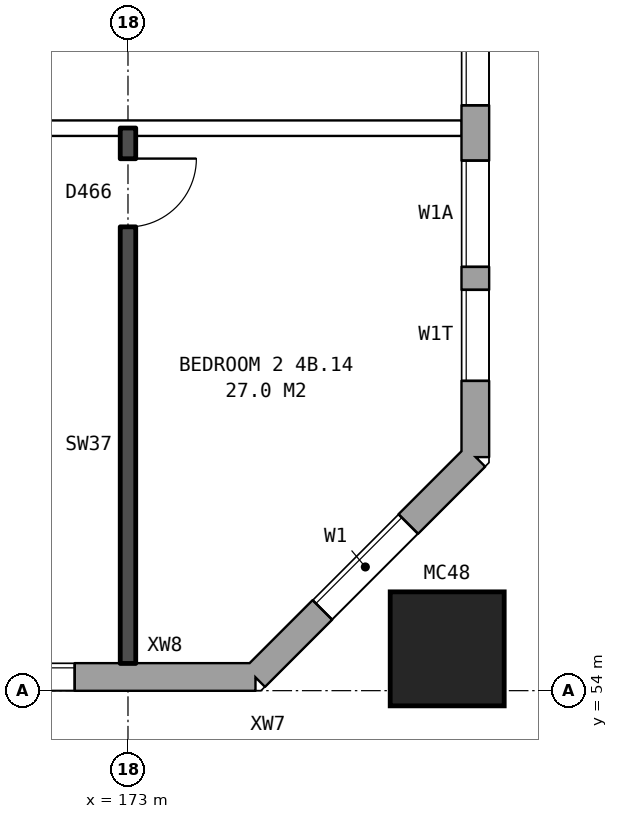
"""IFC4 building model, lengths in metres.
Left out: names, types, materials, properties, quantities, classifications, styles, units other than length and angle.
Written with IfcOpenShell. Run it as: python <this file> out.ifc"""

import sys

from ifc_helpers import new_model, si_unit, direction, frame, frame_2d, origin, origin_2d, place, context, subcontext, project, spatial, rectangle, hollow_rectangle, extrude, element, fill, save


model = new_model("IFC4")
c1 = context("Model", 3, precision=1e-05, world=origin(), true_north=direction((0.0, 1.0)))
c2 = subcontext(c1, "Body", "Model", "MODEL_VIEW")
j1 = project(units=[si_unit("LENGTHUNIT", "METRE"), si_unit("PLANEANGLEUNIT", "RADIAN")], contexts=[c1])
p1 = place(None, origin())
s1 = spatial("IfcSite", under=j1, at=p1, CompositionType="ELEMENT")
p2 = place(p1, origin())
s2 = spatial("IfcBuilding", under=s1, at=p2, CompositionType="ELEMENT")
p3 = place(p2, frame((0.0, 0.0, 19.5)))
s3 = spatial("IfcBuildingStorey", under=s2, at=p3, CompositionType="ELEMENT", Elevation=19.5)
p4 = place(p3, frame((177.2, 54.55, 0.0), z_axis=(0.0, 0.0, 1.0), x_axis=(1.0, 0.0, 0.0)))
e1 = element("IfcColumn", 1, at=p4, inside=s3, PredefinedType="COLUMN", context=c2, shape_type="SweptSolid", body=[
    extrude(hollow_rectangle(XDim=1.5, YDim=1.5, WallThickness=0.08, at=origin_2d()), origin(), (0.0, 0.0, 1.0), 3.1),
])
p5 = place(p3, frame((134.075, 54.18, 0.0), z_axis=(0.0, 0.0, 1.0), x_axis=(1.0, 0.0, 0.0)))
e2 = element("IfcWall", 2, at=p5, inside=s3, PredefinedType="STANDARD", context=c2, shape_type="SweptSolid", body=[
    extrude(rectangle(XDim=40.601, YDim=0.36, at=frame_2d((20.3, 0.0))), origin(), (0.0, 0.0, 1.0), 2.85),
])
p6 = place(p5, frame((0.3, 0.0, 0.8)))
e3 = element("IfcOpeningElement", 3, at=p6, cuts=e2, PredefinedType="OPENING", context=c2, shape_type="SweptSolid", body=[
    extrude(rectangle(XDim=0.8, YDim=0.9, at=frame_2d((0.4, 0.45))), frame((0.0, 0.19, 0.0), z_axis=(0.0, -1.0, 0.0), x_axis=(1.0, 0.0, 0.0)), (0.0, 0.0, 1.0), 0.38),
])
p7 = place(p5, frame((3.625, 0.0, 0.8)))
e4 = element("IfcOpeningElement", 4, at=p7, cuts=e2, PredefinedType="OPENING", context=c2, shape_type="SweptSolid", body=[
    extrude(rectangle(XDim=1.6, YDim=1.8, at=frame_2d((0.8, 0.9))), frame((0.0, 0.19, 0.0), z_axis=(0.0, -1.0, 0.0), x_axis=(1.0, 0.0, 0.0)), (0.0, 0.0, 1.0), 0.38),
])
p8 = place(p5, frame((6.625, 0.0, 0.8)))
e5 = element("IfcOpeningElement", 5, at=p8, cuts=e2, PredefinedType="OPENING", context=c2, shape_type="SweptSolid", body=[
    extrude(rectangle(XDim=1.6, YDim=1.8, at=frame_2d((0.8, 0.9))), frame((0.0, 0.19, 0.0), z_axis=(0.0, -1.0, 0.0), x_axis=(1.0, 0.0, 0.0)), (0.0, 0.0, 1.0), 0.38),
])
p9 = place(p5, frame((9.625, 0.0, 0.8)))
e6 = element("IfcOpeningElement", 6, at=p9, cuts=e2, PredefinedType="OPENING", context=c2, shape_type="SweptSolid", body=[
    extrude(rectangle(XDim=1.6, YDim=1.8, at=frame_2d((0.8, 0.9))), frame((0.0, 0.19, 0.0), z_axis=(0.0, -1.0, 0.0), x_axis=(1.0, 0.0, 0.0)), (0.0, 0.0, 1.0), 0.38),
])
p10 = place(p5, frame((12.625, 0.0, 0.8)))
e7 = element("IfcOpeningElement", 7, at=p10, cuts=e2, PredefinedType="OPENING", context=c2, shape_type="SweptSolid", body=[
    extrude(rectangle(XDim=1.6, YDim=1.8, at=frame_2d((0.8, 0.9))), frame((0.0, 0.19, 0.0), z_axis=(0.0, -1.0, 0.0), x_axis=(1.0, 0.0, 0.0)), (0.0, 0.0, 1.0), 0.38),
])
p11 = place(p5, frame((15.625, 0.0, 0.8)))
e8 = element("IfcOpeningElement", 8, at=p11, cuts=e2, PredefinedType="OPENING", context=c2, shape_type="SweptSolid", body=[
    extrude(rectangle(XDim=1.6, YDim=1.8, at=frame_2d((0.8, 0.9))), frame((0.0, 0.19, 0.0), z_axis=(0.0, -1.0, 0.0), x_axis=(1.0, 0.0, 0.0)), (0.0, 0.0, 1.0), 0.38),
])
p12 = place(p5, frame((18.625, 0.0, 0.8)))
e9 = element("IfcOpeningElement", 9, at=p12, cuts=e2, PredefinedType="OPENING", context=c2, shape_type="SweptSolid", body=[
    extrude(rectangle(XDim=1.6, YDim=1.8, at=frame_2d((0.8, 0.9))), frame((0.0, 0.19, 0.0), z_axis=(0.0, -1.0, 0.0), x_axis=(1.0, 0.0, 0.0)), (0.0, 0.0, 1.0), 0.38),
])
p13 = place(p5, frame((21.625, 0.0, 0.8)))
e10 = element("IfcOpeningElement", 10, at=p13, cuts=e2, PredefinedType="OPENING", context=c2, shape_type="SweptSolid", body=[
    extrude(rectangle(XDim=1.6, YDim=1.8, at=frame_2d((0.8, 0.9))), frame((0.0, 0.19, 0.0), z_axis=(0.0, -1.0, 0.0), x_axis=(1.0, 0.0, 0.0)), (0.0, 0.0, 1.0), 0.38),
])
p14 = place(p5, frame((24.625, 0.0, 0.8)))
e11 = element("IfcOpeningElement", 11, at=p14, cuts=e2, PredefinedType="OPENING", context=c2, shape_type="SweptSolid", body=[
    extrude(rectangle(XDim=1.6, YDim=1.8, at=frame_2d((0.8, 0.9))), frame((0.0, 0.19, 0.0), z_axis=(0.0, -1.0, 0.0), x_axis=(1.0, 0.0, 0.0)), (0.0, 0.0, 1.0), 0.38),
])
p15 = place(p5, frame((27.625, 0.0, 0.8)))
e12 = element("IfcOpeningElement", 12, at=p15, cuts=e2, PredefinedType="OPENING", context=c2, shape_type="SweptSolid", body=[
    extrude(rectangle(XDim=1.6, YDim=1.8, at=frame_2d((0.8, 0.9))), frame((0.0, 0.19, 0.0), z_axis=(0.0, -1.0, 0.0), x_axis=(1.0, 0.0, 0.0)), (0.0, 0.0, 1.0), 0.38),
])
p16 = place(p5, frame((30.625, 0.0, 0.8)))
e13 = element("IfcOpeningElement", 13, at=p16, cuts=e2, PredefinedType="OPENING", context=c2, shape_type="SweptSolid", body=[
    extrude(rectangle(XDim=1.6, YDim=1.8, at=frame_2d((0.8, 0.9))), frame((0.0, 0.19, 0.0), z_axis=(0.0, -1.0, 0.0), x_axis=(1.0, 0.0, 0.0)), (0.0, 0.0, 1.0), 0.38),
])
p17 = place(p5, frame((33.625, 0.0, 0.8)))
e14 = element("IfcOpeningElement", 14, at=p17, cuts=e2, PredefinedType="OPENING", context=c2, shape_type="SweptSolid", body=[
    extrude(rectangle(XDim=1.6, YDim=1.8, at=frame_2d((0.8, 0.9))), frame((0.0, 0.19, 0.0), z_axis=(0.0, -1.0, 0.0), x_axis=(1.0, 0.0, 0.0)), (0.0, 0.0, 1.0), 0.38),
])
p18 = place(p5, frame((36.625, 0.0, 0.8)))
e15 = element("IfcOpeningElement", 15, at=p18, cuts=e2, PredefinedType="OPENING", context=c2, shape_type="SweptSolid", body=[
    extrude(rectangle(XDim=1.6, YDim=1.8, at=frame_2d((0.8, 0.9))), frame((0.0, 0.19, 0.0), z_axis=(0.0, -1.0, 0.0), x_axis=(1.0, 0.0, 0.0)), (0.0, 0.0, 1.0), 0.38),
])
p19 = place(p5, frame((1.4, 0.0, 0.8)))
e16 = element("IfcOpeningElement", 16, at=p19, cuts=e2, PredefinedType="OPENING", context=c2, shape_type="SweptSolid", body=[
    extrude(rectangle(XDim=1.2, YDim=1.8, at=frame_2d((0.6, 0.9))), frame((0.0, 0.19, 0.0), z_axis=(0.0, -1.0, 0.0), x_axis=(1.0, 0.0, 0.0)), (0.0, 0.0, 1.0), 0.38),
])
p20 = place(p3, frame((174.675, 54.18, 0.0), z_axis=(0.0, 0.0, 1.0), x_axis=(0.707106781187, 0.707106781187, 0.0)))
e17 = element("IfcWall", 17, at=p20, inside=s3, PredefinedType="STANDARD", context=c2, shape_type="SweptSolid", body=[
    extrude(rectangle(XDim=4.094, YDim=0.36, at=frame_2d((2.047, 0.0))), origin(), (0.0, 0.0, 1.0), 2.85),
])
p21 = place(p20, frame((1.247, 0.0, 0.8)))
e18 = element("IfcOpeningElement", 18, at=p21, cuts=e17, PredefinedType="OPENING", context=c2, shape_type="SweptSolid", body=[
    extrude(rectangle(XDim=1.6, YDim=1.8, at=frame_2d((0.8, 0.9))), frame((0.0, 0.19, 0.0), z_axis=(0.0, -1.0, 0.0), x_axis=(1.0, 0.0, 0.0)), (0.0, 0.0, 1.0), 0.38),
])
p22 = place(p3, frame((177.57, 57.075, 0.0), z_axis=(0.0, 0.0, 1.0), x_axis=(0.0, 1.0, 0.0)))
e19 = element("IfcWall", 19, at=p22, inside=s3, PredefinedType="STANDARD", context=c2, shape_type="SweptSolid", body=[
    extrude(rectangle(XDim=25.851, YDim=0.36, at=frame_2d((12.925, 0.0))), origin(), (0.0, 0.0, 1.0), 2.85),
])
p23 = place(p22, frame((1.0, 0.0, 0.8)))
e20 = element("IfcOpeningElement", 20, at=p23, cuts=e19, PredefinedType="OPENING", context=c2, shape_type="SweptSolid", body=[
    extrude(rectangle(XDim=1.2, YDim=0.9, at=frame_2d((0.6, 0.45))), frame((0.0, 0.19, 0.0), z_axis=(0.0, -1.0, 0.0), x_axis=(1.0, 0.0, 0.0)), (0.0, 0.0, 1.0), 0.38),
])
p24 = place(p22, frame((4.625, 0.0, 0.8)))
e21 = element("IfcOpeningElement", 21, at=p24, cuts=e19, PredefinedType="OPENING", context=c2, shape_type="SweptSolid", body=[
    extrude(rectangle(XDim=1.6, YDim=1.8, at=frame_2d((0.8, 0.9))), frame((0.0, 0.19, 0.0), z_axis=(0.0, -1.0, 0.0), x_axis=(1.0, 0.0, 0.0)), (0.0, 0.0, 1.0), 0.38),
])
p25 = place(p22, frame((7.625, 0.0, 0.8)))
e22 = element("IfcOpeningElement", 22, at=p25, cuts=e19, PredefinedType="OPENING", context=c2, shape_type="SweptSolid", body=[
    extrude(rectangle(XDim=1.6, YDim=1.8, at=frame_2d((0.8, 0.9))), frame((0.0, 0.19, 0.0), z_axis=(0.0, -1.0, 0.0), x_axis=(1.0, 0.0, 0.0)), (0.0, 0.0, 1.0), 0.38),
])
p26 = place(p22, frame((10.625, 0.0, 0.8)))
e23 = element("IfcOpeningElement", 23, at=p26, cuts=e19, PredefinedType="OPENING", context=c2, shape_type="SweptSolid", body=[
    extrude(rectangle(XDim=1.6, YDim=1.8, at=frame_2d((0.8, 0.9))), frame((0.0, 0.19, 0.0), z_axis=(0.0, -1.0, 0.0), x_axis=(1.0, 0.0, 0.0)), (0.0, 0.0, 1.0), 0.38),
])
p27 = place(p22, frame((13.625, 0.0, 0.8)))
e24 = element("IfcOpeningElement", 24, at=p27, cuts=e19, PredefinedType="OPENING", context=c2, shape_type="SweptSolid", body=[
    extrude(rectangle(XDim=1.6, YDim=1.8, at=frame_2d((0.8, 0.9))), frame((0.0, 0.19, 0.0), z_axis=(0.0, -1.0, 0.0), x_axis=(1.0, 0.0, 0.0)), (0.0, 0.0, 1.0), 0.38),
])
p28 = place(p22, frame((16.625, 0.0, 0.8)))
e25 = element("IfcOpeningElement", 25, at=p28, cuts=e19, PredefinedType="OPENING", context=c2, shape_type="SweptSolid", body=[
    extrude(rectangle(XDim=1.6, YDim=1.8, at=frame_2d((0.8, 0.9))), frame((0.0, 0.19, 0.0), z_axis=(0.0, -1.0, 0.0), x_axis=(1.0, 0.0, 0.0)), (0.0, 0.0, 1.0), 0.38),
])
p29 = place(p22, frame((19.625, 0.0, 0.8)))
e26 = element("IfcOpeningElement", 26, at=p29, cuts=e19, PredefinedType="OPENING", context=c2, shape_type="SweptSolid", body=[
    extrude(rectangle(XDim=1.6, YDim=1.8, at=frame_2d((0.8, 0.9))), frame((0.0, 0.19, 0.0), z_axis=(0.0, -1.0, 0.0), x_axis=(1.0, 0.0, 0.0)), (0.0, 0.0, 1.0), 0.38),
])
p30 = place(p22, frame((21.725, 0.0, 0.8)))
e27 = element("IfcOpeningElement", 27, at=p30, cuts=e19, PredefinedType="OPENING", context=c2, shape_type="SweptSolid", body=[
    extrude(rectangle(XDim=1.6, YDim=1.8, at=frame_2d((0.8, 0.9))), frame((0.0, 0.19, 0.0), z_axis=(0.0, -1.0, 0.0), x_axis=(1.0, 0.0, 0.0)), (0.0, 0.0, 1.0), 0.38),
])
p31 = place(p22, frame((2.5, 0.0, 0.8)))
e28 = element("IfcOpeningElement", 28, at=p31, cuts=e19, PredefinedType="OPENING", context=c2, shape_type="SweptSolid", body=[
    extrude(rectangle(XDim=1.4, YDim=1.8, at=frame_2d((0.7, 0.9))), frame((0.0, 0.19, 0.0), z_axis=(0.0, -1.0, 0.0), x_axis=(1.0, 0.0, 0.0)), (0.0, 0.0, 1.0), 0.38),
])
p32 = place(p22, frame((23.625, 0.0, 0.8)))
e29 = element("IfcOpeningElement", 29, at=p32, cuts=e19, PredefinedType="OPENING", context=c2, shape_type="SweptSolid", body=[
    extrude(rectangle(XDim=0.6, YDim=1.2, at=frame_2d((0.3, 0.6))), frame((0.0, 0.19, 0.0), z_axis=(0.0, -1.0, 0.0), x_axis=(1.0, 0.0, 0.0)), (0.0, 0.0, 1.0), 0.38),
])
p33 = place(p3, frame((155.1, 61.4, 0.0), z_axis=(0.0, 0.0, 1.0), x_axis=(1.0, 0.0, 0.0)))
e30 = element("IfcWall", 30, at=p33, inside=s3, PredefinedType="PARTITIONING", context=c2, shape_type="SweptSolid", body=[
    extrude(rectangle(XDim=22.29, YDim=0.2, at=frame_2d((11.145, 0.0))), origin(), (0.0, 0.0, 1.0), 2.85),
])
p34 = place(p33, frame((2.45, 0.0, 0.0)))
e31 = element("IfcOpeningElement", 31, at=p34, cuts=e30, PredefinedType="OPENING", context=c2, shape_type="SweptSolid", body=[
    extrude(rectangle(XDim=1.0, YDim=2.1, at=frame_2d((0.5, 1.05))), frame((0.0, 0.11, 0.0), z_axis=(0.0, -1.0, 0.0), x_axis=(1.0, 0.0, 0.0)), (0.0, 0.0, 1.0), 0.22),
])
p35 = place(p33, frame((14.4, 0.0, 0.0)))
e32 = element("IfcOpeningElement", 32, at=p35, cuts=e30, PredefinedType="OPENING", context=c2, shape_type="SweptSolid", body=[
    extrude(rectangle(XDim=1.0, YDim=2.1, at=frame_2d((0.5, 1.05))), frame((0.0, 0.11, 0.0), z_axis=(0.0, -1.0, 0.0), x_axis=(1.0, 0.0, 0.0)), (0.0, 0.0, 1.0), 0.22),
])
p36 = place(p3, frame((173.0, 54.36, 0.0), z_axis=(0.0, 0.0, 1.0), x_axis=(0.0, 1.0, 0.0)))
e33 = element("IfcWall", 33, at=p36, inside=s3, PredefinedType="SOLIDWALL", context=c2, shape_type="SweptSolid", body=[
    extrude(rectangle(XDim=7.04, YDim=0.2, at=frame_2d((3.52, 0.0))), origin(), (0.0, 0.0, 1.0), 2.85),
])
p37 = place(p36, frame((5.74, 0.0, 0.0)))
e34 = element("IfcOpeningElement", 34, at=p37, cuts=e33, PredefinedType="OPENING", context=c2, shape_type="SweptSolid", body=[
    extrude(rectangle(XDim=0.9, YDim=2.1, at=frame_2d((0.45, 1.05))), frame((0.0, 0.11, 0.0), z_axis=(0.0, -1.0, 0.0), x_axis=(1.0, 0.0, 0.0)), (0.0, 0.0, 1.0), 0.22),
])
p38 = place(p18, origin())
e35 = element("IfcWindow", 35, at=p38, inside=s3, PartitioningType="SINGLE_PANEL", PredefinedType="WINDOW", context=c2, shape_type="SweptSolid", body=[
    extrude(rectangle(XDim=1.6, YDim=1.8, at=frame_2d((0.8, 0.9))), frame((0.0, 0.15, 0.0), z_axis=(0.0, -1.0, 0.0), x_axis=(1.0, 0.0, 0.0)), (0.0, 0.0, 1.0), 0.06),
])
fill(e15, e35)
p39 = place(p21, origin())
e36 = element("IfcWindow", 36, at=p39, inside=s3, PartitioningType="SINGLE_PANEL", PredefinedType="WINDOW", context=c2, shape_type="SweptSolid", body=[
    extrude(rectangle(XDim=1.6, YDim=1.8, at=frame_2d((0.8, 0.9))), frame((0.0, 0.15, 0.0), z_axis=(0.0, -1.0, 0.0), x_axis=(1.0, 0.0, 0.0)), (0.0, 0.0, 1.0), 0.06),
])
fill(e18, e36)
p40 = place(p23, origin())
e37 = element("IfcWindow", 37, at=p40, inside=s3, PartitioningType="SINGLE_PANEL", PredefinedType="WINDOW", context=c2, shape_type="SweptSolid", body=[
    extrude(rectangle(XDim=1.2, YDim=0.9, at=frame_2d((0.6, 0.45))), frame((0.0, 0.15, 0.0), z_axis=(0.0, -1.0, 0.0), x_axis=(1.0, 0.0, 0.0)), (0.0, 0.0, 1.0), 0.06),
])
fill(e20, e37)
p41 = place(p24, origin())
e38 = element("IfcWindow", 38, at=p41, inside=s3, PartitioningType="SINGLE_PANEL", PredefinedType="WINDOW", context=c2, shape_type="SweptSolid", body=[
    extrude(rectangle(XDim=1.6, YDim=1.8, at=frame_2d((0.8, 0.9))), frame((0.0, 0.15, 0.0), z_axis=(0.0, -1.0, 0.0), x_axis=(1.0, 0.0, 0.0)), (0.0, 0.0, 1.0), 0.06),
])
fill(e21, e38)
p42 = place(p37, frame((0.9, 0.0, 0.0), z_axis=(0.0, 0.0, 1.0), x_axis=(-1.0, 0.0, 0.0)))
e39 = element("IfcDoor", 39, at=p42, inside=s3, OperationType="SINGLE_SWING_LEFT", PredefinedType="DOOR", context=c2, shape_type="SweptSolid", body=[
    extrude(rectangle(XDim=0.9, YDim=2.1, at=frame_2d((0.45, 1.05))), frame((0.0, 0.025, 0.0), z_axis=(0.0, -1.0, 0.0), x_axis=(1.0, 0.0, 0.0)), (0.0, 0.0, 1.0), 0.05),
])
fill(e34, e39)
p43 = place(p31, origin())
e40 = element("IfcWindow", 40, at=p43, inside=s3, PartitioningType="SINGLE_PANEL", PredefinedType="WINDOW", context=c2, shape_type="SweptSolid", body=[
    extrude(rectangle(XDim=1.4, YDim=1.8, at=frame_2d((0.7, 0.9))), frame((0.0, 0.15, 0.0), z_axis=(0.0, -1.0, 0.0), x_axis=(1.0, 0.0, 0.0)), (0.0, 0.0, 1.0), 0.06),
])
fill(e28, e40)
save(model, sys.argv[1])
